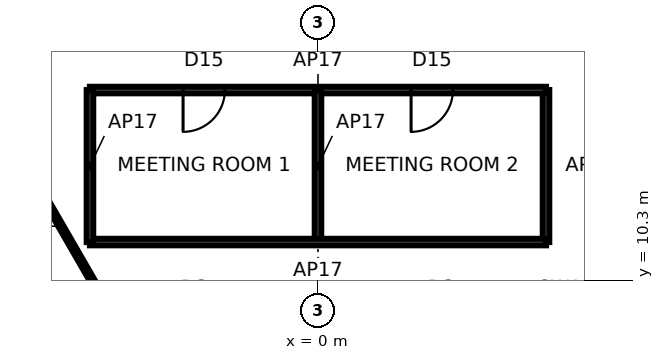
"""IFC4 building model, lengths in metres.
Left out: names, types, materials, properties, quantities, classifications, styles, units other than length and angle.
Written with IfcOpenShell. Run it as: python <this file> out.ifc"""

import sys

from ifc_helpers import new_model, si_unit, direction, frame, frame_2d, origin, place, context, subcontext, project, spatial, rectangle, extrude, element, fill, save


model = new_model("IFC4")
c1 = context("Model", 3, precision=1e-05, world=origin(), true_north=direction((0.0, 1.0)))
c2 = subcontext(c1, "Body", "Model", "MODEL_VIEW")
j1 = project(units=[si_unit("LENGTHUNIT", "METRE"), si_unit("PLANEANGLEUNIT", "RADIAN")], contexts=[c1])
p1 = place(None, origin())
s1 = spatial("IfcSite", under=j1, at=p1, CompositionType="ELEMENT")
p2 = place(p1, origin())
s2 = spatial("IfcBuilding", under=s1, at=p2, CompositionType="ELEMENT")
p3 = place(p2, frame((0.0, 0.0, 96.3)))
s3 = spatial("IfcBuildingStorey", under=s2, at=p3, CompositionType="ELEMENT", Elevation=96.3)
p4 = place(p3, frame((6.0, 15.3, 0.0), z_axis=(0.0, 0.0, 1.0), x_axis=(0.0, -1.0, 0.0)))
e1 = element("IfcWall", 1, at=p4, inside=s3, PredefinedType="PARTITIONING", context=c2, shape_type="SweptSolid", body=[
    extrude(rectangle(XDim=4.0, YDim=0.17, at=frame_2d((2.0, 0.0))), origin(), (0.0, 0.0, 1.0), 3.74),
])
p5 = place(p3, frame((-6.0, 15.3, 0.0), z_axis=(0.0, 0.0, 1.0), x_axis=(1.0, 0.0, 0.0)))
e2 = element("IfcWall", 2, at=p5, inside=s3, PredefinedType="PARTITIONING", context=c2, shape_type="SweptSolid", body=[
    extrude(rectangle(XDim=12.0, YDim=0.17, at=frame_2d((6.0, 0.0))), origin(), (0.0, 0.0, 1.0), 3.286),
])
p6 = place(p5, frame((2.45, 0.0, 0.0)))
e3 = element("IfcOpeningElement", 3, at=p6, cuts=e2, PredefinedType="OPENING", context=c2, shape_type="SweptSolid", body=[
    extrude(rectangle(XDim=1.1, YDim=2.4, at=frame_2d((0.55, 1.2))), frame((0.0, 0.095, 0.0), z_axis=(0.0, -1.0, 0.0), x_axis=(1.0, 0.0, 0.0)), (0.0, 0.0, 1.0), 0.19),
])
p7 = place(p5, frame((8.45, 0.0, 0.0)))
e4 = element("IfcOpeningElement", 4, at=p7, cuts=e2, PredefinedType="OPENING", context=c2, shape_type="SweptSolid", body=[
    extrude(rectangle(XDim=1.1, YDim=2.4, at=frame_2d((0.55, 1.2))), frame((0.0, 0.095, 0.0), z_axis=(0.0, -1.0, 0.0), x_axis=(1.0, 0.0, 0.0)), (0.0, 0.0, 1.0), 0.19),
])
p8 = place(p3, frame((0.0, 15.3, 0.0), z_axis=(0.0, 0.0, 1.0), x_axis=(0.0, -1.0, 0.0)))
e5 = element("IfcWall", 5, at=p8, inside=s3, PredefinedType="PARTITIONING", context=c2, shape_type="SweptSolid", body=[
    extrude(rectangle(XDim=4.0, YDim=0.17, at=frame_2d((2.0, 0.0))), origin(), (0.0, 0.0, 1.0), 2.94),
])
p9 = place(p3, frame((6.0, 11.3, 0.0), z_axis=(0.0, 0.0, 1.0), x_axis=(-1.0, 0.0, 0.0)))
e6 = element("IfcWall", 6, at=p9, inside=s3, PredefinedType="PARTITIONING", context=c2, shape_type="SweptSolid", body=[
    extrude(rectangle(XDim=12.0, YDim=0.17, at=frame_2d((6.0, 0.0))), origin(), (0.0, 0.0, 1.0), 3.74),
])
p10 = place(p3, frame((-6.0, 11.3, 0.0), z_axis=(0.0, 0.0, 1.0), x_axis=(0.0, 1.0, 0.0)))
e7 = element("IfcWall", 7, at=p10, inside=s3, PredefinedType="PARTITIONING", context=c2, shape_type="SweptSolid", body=[
    extrude(rectangle(XDim=4.0, YDim=0.17, at=frame_2d((2.0, 0.0))), origin(), (0.0, 0.0, 1.0), 3.74),
])
p11 = place(p3, frame((-5.485, 9.5, 0.0), z_axis=(0.0, 0.0, 1.0), x_axis=(-0.500002645523, 0.866023876385, 0.0)))
e8 = element("IfcWall", 8, at=p11, inside=s3, PredefinedType="PARTITIONING", context=c2, shape_type="SweptSolid", body=[
    extrude(rectangle(XDim=11.54, YDim=0.12, at=frame_2d((5.77, 0.0))), origin(), (0.0, 0.0, 1.0), 3.74),
])
p12 = place(p11, frame((5.27, 0.0, 0.0)))
e9 = element("IfcOpeningElement", 9, at=p12, cuts=e8, PredefinedType="OPENING", context=c2, shape_type="SweptSolid", body=[
    extrude(rectangle(XDim=1.0, YDim=2.4, at=frame_2d((0.5, 1.2))), frame((0.0, 0.07, 0.0), z_axis=(0.0, -1.0, 0.0), x_axis=(1.0, 0.0, 0.0)), (0.0, 0.0, 1.0), 0.14),
])
p13 = place(p6, frame((1.1, 0.0, 0.0), z_axis=(0.0, 0.0, 1.0), x_axis=(-1.0, 0.0, 0.0)))
e10 = element("IfcDoor", 10, at=p13, inside=s3, OperationType="SINGLE_SWING_RIGHT", PredefinedType="DOOR", context=c2, shape_type="SweptSolid", body=[
    extrude(rectangle(XDim=1.1, YDim=2.4, at=frame_2d((0.55, 1.2))), frame((0.0, 0.025, 0.0), z_axis=(0.0, -1.0, 0.0), x_axis=(1.0, 0.0, 0.0)), (0.0, 0.0, 1.0), 0.05),
])
fill(e3, e10)
p14 = place(p7, frame((1.1, 0.0, 0.0), z_axis=(0.0, 0.0, 1.0), x_axis=(-1.0, 0.0, 0.0)))
e11 = element("IfcDoor", 11, at=p14, inside=s3, OperationType="SINGLE_SWING_RIGHT", PredefinedType="DOOR", context=c2, shape_type="SweptSolid", body=[
    extrude(rectangle(XDim=1.1, YDim=2.4, at=frame_2d((0.55, 1.2))), frame((0.0, 0.025, 0.0), z_axis=(0.0, -1.0, 0.0), x_axis=(1.0, 0.0, 0.0)), (0.0, 0.0, 1.0), 0.05),
])
fill(e4, e11)
save(model, sys.argv[1])
